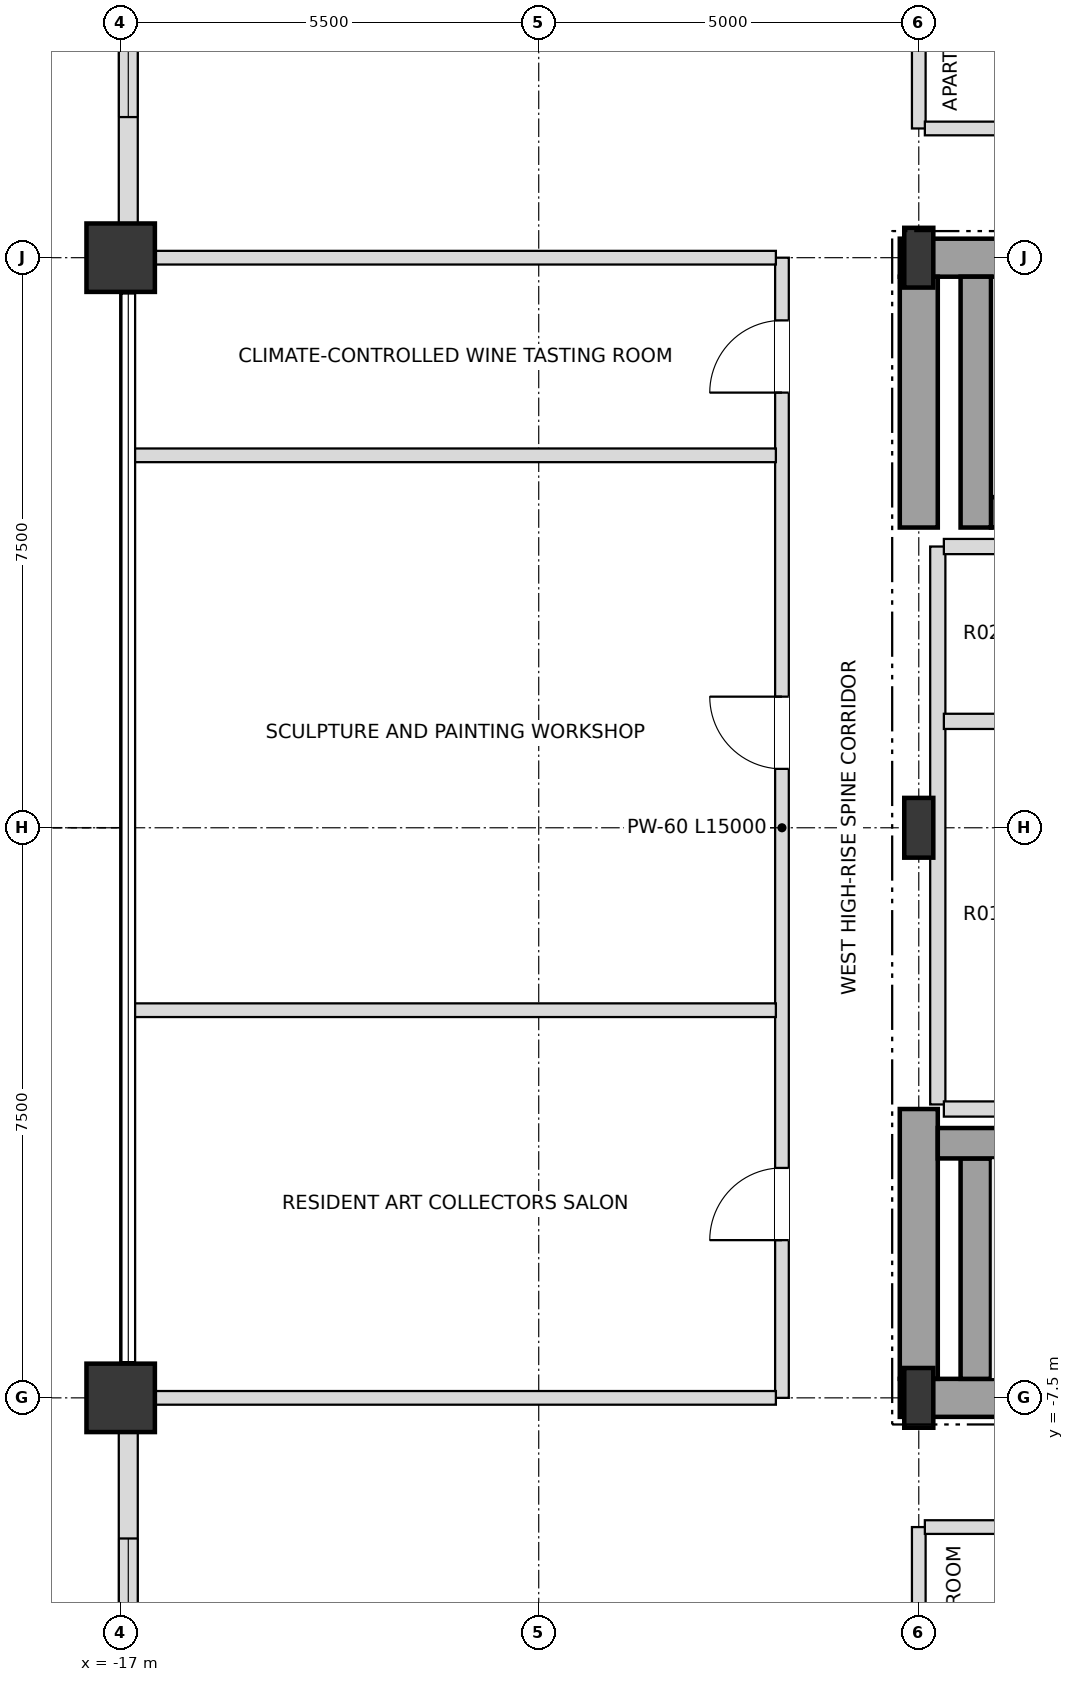
"""IFC4 building model, lengths in metres.
Left out: names, types, materials, properties, quantities, classifications, styles, units other than length and angle.
Written with IfcOpenShell. Run it as: python <this file> out.ifc"""

import sys

from ifc_helpers import new_model, si_unit, direction, frame, frame_2d, origin, origin_2d, place, context, subcontext, project, spatial, rectangle, i_section, extrude, element, fill, save


model = new_model("IFC4")
c1 = context("Model", 3, precision=1e-05, world=origin(), true_north=direction((0.0, 1.0)))
c2 = subcontext(c1, "Body", "Model", "MODEL_VIEW")
j1 = project(units=[si_unit("LENGTHUNIT", "METRE"), si_unit("PLANEANGLEUNIT", "RADIAN")], contexts=[c1])
p1 = place(None, origin())
s1 = spatial("IfcSite", under=j1, at=p1, CompositionType="ELEMENT")
p2 = place(p1, origin())
s2 = spatial("IfcBuilding", under=s1, at=p2, CompositionType="ELEMENT")
p3 = place(p2, frame((0.0, 0.0, 240.3)))
s3 = spatial("IfcBuildingStorey", under=s2, at=p3, CompositionType="ELEMENT", Elevation=240.3)
for number, where, z_axis, x_axis in (
    (1, (-6.5, -7.5, 0.0), (0.0, 0.0, 1.0), (1.0, 0.0, 0.0)),
    (2, (-6.5, 0.0, 0.0), (0.0, 0.0, 1.0), (1.0, 0.0, 0.0)),
    (3, (-6.5, 7.5, 0.0), (0.0, 0.0, 1.0), (1.0, 0.0, 0.0)),
):
    element("IfcColumn", number, at=place(p3, frame(where, z_axis=z_axis, x_axis=x_axis)), inside=s3, PredefinedType="COLUMN", context=c2, shape_type="SweptSolid", body=[
        extrude(i_section(OverallWidth=0.382, OverallDepth=0.786, WebThickness=0.02, FlangeThickness=0.033, at=origin_2d()), origin(), (0.0, 0.0, 1.0), 3.6),
    ])
for number, where, z_axis, x_axis in (
    (4, (-17.0, 7.5, 0.0), (0.0, 0.0, 1.0), (1.0, 0.0, 0.0)),
    (5, (-17.0, -7.5, 0.0), (0.0, 0.0, 1.0), (1.0, 0.0, 0.0)),
):
    element("IfcColumn", number, at=place(p3, frame(where, z_axis=z_axis, x_axis=x_axis)), inside=s3, PredefinedType="USERDEFINED", context=c2, shape_type="SweptSolid", body=[
        extrude(rectangle(XDim=0.9, YDim=0.9, at=origin_2d()), origin(), (0.0, 0.0, 1.0), 3.6),
    ])
p4 = place(p3, frame((-16.9, 12.555, 0.0), z_axis=(0.0, 0.0, 1.0), x_axis=(0.0, -1.0, 0.0)))
e6 = element("IfcWall", 6, at=p4, inside=s3, PredefinedType="SOLIDWALL", context=c2, shape_type="SweptSolid", body=[
    extrude(rectangle(XDim=4.61, YDim=0.25, at=frame_2d((2.305, 0.0))), origin(), (0.0, 0.0, 1.0), 2.748),
])
p5 = place(p4, frame((1.405, 0.0, 0.72)))
e7 = element("IfcOpeningElement", 7, at=p5, cuts=e6, PredefinedType="OPENING", context=c2, shape_type="SweptSolid", body=[
    extrude(rectangle(XDim=1.8, YDim=1.68, at=frame_2d((0.9, 0.84))), frame((0.0, 0.135, 0.0), z_axis=(0.0, -1.0, 0.0), x_axis=(1.0, 0.0, 0.0)), (0.0, 0.0, 1.0), 0.27),
])
p6 = place(p3, frame((-16.9, -7.945, 0.0), z_axis=(0.0, 0.0, 1.0), x_axis=(0.0, -1.0, 0.0)))
e8 = element("IfcWall", 8, at=p6, inside=s3, PredefinedType="SOLIDWALL", context=c2, shape_type="SweptSolid", body=[
    extrude(rectangle(XDim=4.61, YDim=0.25, at=frame_2d((2.305, 0.0))), origin(), (0.0, 0.0, 1.0), 2.748),
])
p7 = place(p6, frame((1.405, 0.0, 0.72)))
e9 = element("IfcOpeningElement", 9, at=p7, cuts=e8, PredefinedType="OPENING", context=c2, shape_type="SweptSolid", body=[
    extrude(rectangle(XDim=1.8, YDim=1.68, at=frame_2d((0.9, 0.84))), frame((0.0, 0.135, 0.0), z_axis=(0.0, -1.0, 0.0), x_axis=(1.0, 0.0, 0.0)), (0.0, 0.0, 1.0), 0.27),
])
p8 = place(p3, frame((-6.75, -7.5, 0.0), z_axis=(0.0, 0.0, 1.0), x_axis=(1.0, 0.0, 0.0)))
e10 = element("IfcWall", 10, at=p8, inside=s3, PredefinedType="SHEAR", context=c2, shape_type="SweptSolid", body=[
    extrude(rectangle(XDim=6.75, YDim=0.5, at=frame_2d((3.375, 0.0))), origin(), (0.0, 0.0, 1.0), 3.38),
])
p9 = place(p3, frame((-6.75, 7.5, 0.0), z_axis=(0.0, 0.0, 1.0), x_axis=(1.0, 0.0, 0.0)))
e11 = element("IfcWall", 11, at=p9, inside=s3, PredefinedType="SHEAR", context=c2, shape_type="SweptSolid", body=[
    extrude(rectangle(XDim=6.75, YDim=0.5, at=frame_2d((3.375, 0.0))), origin(), (0.0, 0.0, 1.0), 3.38),
])
p10 = place(p9, frame((1.65, 0.0, 0.0)))
e12 = element("IfcOpeningElement", 12, at=p10, cuts=e11, PredefinedType="OPENING", context=c2, shape_type="SweptSolid", body=[
    extrude(rectangle(XDim=1.05, YDim=2.15, at=frame_2d((0.525, 1.075))), frame((0.0, 0.26, 0.0), z_axis=(0.0, -1.0, 0.0), x_axis=(1.0, 0.0, 0.0)), (0.0, 0.0, 1.0), 0.52),
])
p11 = place(p3, frame((-6.5, -7.25, 0.0), z_axis=(0.0, 0.0, 1.0), x_axis=(0.0, 1.0, 0.0)))
e13 = element("IfcWall", 13, at=p11, inside=s3, PredefinedType="SHEAR", context=c2, shape_type="SweptSolid", body=[
    extrude(rectangle(XDim=3.55, YDim=0.5, at=frame_2d((1.775, 0.0))), origin(), (0.0, 0.0, 1.0), 3.38),
])
p12 = place(p3, frame((-6.5, 3.95, 0.0), z_axis=(0.0, 0.0, 1.0), x_axis=(0.0, 1.0, 0.0)))
e14 = element("IfcWall", 14, at=p12, inside=s3, PredefinedType="SHEAR", context=c2, shape_type="SweptSolid", body=[
    extrude(rectangle(XDim=3.3, YDim=0.5, at=frame_2d((1.65, 0.0))), origin(), (0.0, 0.0, 1.0), 3.38),
])
p13 = place(p3, frame((-5.75, -7.25, 0.0), z_axis=(0.0, 0.0, 1.0), x_axis=(0.0, 1.0, 0.0)))
e15 = element("IfcWall", 15, at=p13, inside=s3, PredefinedType="SHEAR", context=c2, shape_type="SweptSolid", body=[
    extrude(rectangle(XDim=2.9, YDim=0.4, at=frame_2d((1.45, 0.0))), origin(), (0.0, 0.0, 1.0), 3.38),
])
p14 = place(p3, frame((-6.25, -4.15, 0.0), z_axis=(0.0, 0.0, 1.0), x_axis=(1.0, 0.0, 0.0)))
e16 = element("IfcWall", 16, at=p14, inside=s3, PredefinedType="SHEAR", context=c2, shape_type="SweptSolid", body=[
    extrude(rectangle(XDim=7.78, YDim=0.4, at=frame_2d((3.89, 0.0))), origin(), (0.0, 0.0, 1.0), 3.38),
])
p15 = place(p3, frame((-5.55, 4.15, 0.0), z_axis=(0.0, 0.0, 1.0), x_axis=(1.0, 0.0, 0.0)))
e17 = element("IfcWall", 17, at=p15, inside=s3, PredefinedType="SHEAR", context=c2, shape_type="SweptSolid", body=[
    extrude(rectangle(XDim=7.08, YDim=0.4, at=frame_2d((3.54, 0.0))), origin(), (0.0, 0.0, 1.0), 3.38),
])
p16 = place(p3, frame((-5.75, 3.95, 0.0), z_axis=(0.0, 0.0, 1.0), x_axis=(0.0, 1.0, 0.0)))
e18 = element("IfcWall", 18, at=p16, inside=s3, PredefinedType="SHEAR", context=c2, shape_type="SweptSolid", body=[
    extrude(rectangle(XDim=3.3, YDim=0.4, at=frame_2d((1.65, 0.0))), origin(), (0.0, 0.0, 1.0), 3.38),
])
p17 = place(p3, frame((-8.3, -7.5, 0.0), z_axis=(0.0, 0.0, 1.0), x_axis=(0.0, 1.0, 0.0)))
e19 = element("IfcWall", 19, at=p17, inside=s3, PredefinedType="PARTITIONING", context=c2, shape_type="SweptSolid", body=[
    extrude(rectangle(XDim=15.0, YDim=0.18, at=frame_2d((7.5, 0.0))), origin(), (0.0, 0.0, 1.0), 3.38),
])
p18 = place(p17, frame((2.075, 0.0, 0.0)))
e20 = element("IfcOpeningElement", 20, at=p18, cuts=e19, PredefinedType="OPENING", context=c2, shape_type="SweptSolid", body=[
    extrude(rectangle(XDim=0.95, YDim=2.15, at=frame_2d((0.475, 1.075))), frame((0.0, 0.1, 0.0), z_axis=(0.0, -1.0, 0.0), x_axis=(1.0, 0.0, 0.0)), (0.0, 0.0, 1.0), 0.2),
])
p19 = place(p17, frame((8.275, 0.0, 0.0)))
e21 = element("IfcOpeningElement", 21, at=p19, cuts=e19, PredefinedType="OPENING", context=c2, shape_type="SweptSolid", body=[
    extrude(rectangle(XDim=0.95, YDim=2.15, at=frame_2d((0.475, 1.075))), frame((0.0, 0.1, 0.0), z_axis=(0.0, -1.0, 0.0), x_axis=(1.0, 0.0, 0.0)), (0.0, 0.0, 1.0), 0.2),
])
p20 = place(p17, frame((13.225, 0.0, 0.0)))
e22 = element("IfcOpeningElement", 22, at=p20, cuts=e19, PredefinedType="OPENING", context=c2, shape_type="SweptSolid", body=[
    extrude(rectangle(XDim=0.95, YDim=2.15, at=frame_2d((0.475, 1.075))), frame((0.0, 0.1, 0.0), z_axis=(0.0, -1.0, 0.0), x_axis=(1.0, 0.0, 0.0)), (0.0, 0.0, 1.0), 0.2),
])
for number, where, z_axis, x_axis in (
    (23, (-6.5, -19.9, 0.0), (0.0, 0.0, 1.0), (0.0, 1.0, 0.0)),
    (24, (-6.5, 9.2, 0.0), (0.0, 0.0, 1.0), (0.0, 1.0, 0.0)),
):
    element("IfcWall", number, at=place(p3, frame(where, z_axis=z_axis, x_axis=x_axis)), inside=s3, PredefinedType="PARTITIONING", context=c2, shape_type="SweptSolid", body=[
        extrude(rectangle(XDim=10.7, YDim=0.18, at=frame_2d((5.35, 0.0))), origin(), (0.0, 0.0, 1.0), 2.826),
    ])
p21 = place(p3, frame((-6.25, -3.64, 0.0), z_axis=(0.0, 0.0, 1.0), x_axis=(0.0, 1.0, 0.0)))
e25 = element("IfcWall", 25, at=p21, inside=s3, PredefinedType="SOLIDWALL", context=c2, shape_type="SweptSolid", body=[
    extrude(rectangle(XDim=7.34, YDim=0.2, at=frame_2d((3.67, 0.0))), origin(), (0.0, 0.0, 1.0), 3.38),
])
p22 = place(p3, frame((-6.42, -9.2, 0.0), z_axis=(0.0, 0.0, 1.0), x_axis=(1.0, 0.0, 0.0)))
e26 = element("IfcWall", 26, at=p22, inside=s3, PredefinedType="PARTITIONING", context=c2, shape_type="SweptSolid", body=[
    extrude(rectangle(XDim=1.69, YDim=0.18, at=frame_2d((0.845, 0.0))), origin(), (0.0, 0.0, 1.0), 3.38),
])
p23 = place(p3, frame((-16.9, -7.5, 0.0), z_axis=(0.0, 0.0, 1.0), x_axis=(1.0, 0.0, 0.0)))
e27 = element("IfcWall", 27, at=p23, inside=s3, PredefinedType="PARTITIONING", context=c2, shape_type="SweptSolid", body=[
    extrude(rectangle(XDim=8.52, YDim=0.18, at=frame_2d((4.26, 0.0))), origin(), (0.0, 0.0, 1.0), 2.826),
])
p24 = place(p3, frame((-6.17, -3.7, 0.0), z_axis=(0.0, 0.0, 1.0), x_axis=(1.0, 0.0, 0.0)))
e28 = element("IfcWall", 28, at=p24, inside=s3, PredefinedType="SOLIDWALL", context=c2, shape_type="SweptSolid", body=[
    extrude(rectangle(XDim=1.94, YDim=0.2, at=frame_2d((0.97, 0.0))), origin(), (0.0, 0.0, 1.0), 3.38),
])
p25 = place(p3, frame((-16.82, -2.4, 0.0), z_axis=(0.0, 0.0, 1.0), x_axis=(1.0, 0.0, 0.0)))
e29 = element("IfcWall", 29, at=p25, inside=s3, PredefinedType="PARTITIONING", context=c2, shape_type="SweptSolid", body=[
    extrude(rectangle(XDim=8.44, YDim=0.18, at=frame_2d((4.22, 0.0))), origin(), (0.0, 0.0, 1.0), 3.018),
])
for number, where, z_axis, x_axis in (
    (30, (-6.17, 1.4, 0.0), (0.0, 0.0, 1.0), (1.0, 0.0, 0.0)),
    (31, (-6.17, 3.7, 0.0), (0.0, 0.0, 1.0), (1.0, 0.0, 0.0)),
):
    element("IfcWall", number, at=place(p3, frame(where, z_axis=z_axis, x_axis=x_axis)), inside=s3, PredefinedType="SOLIDWALL", context=c2, shape_type="SweptSolid", body=[
        extrude(rectangle(XDim=1.94, YDim=0.2, at=frame_2d((0.97, 0.0))), origin(), (0.0, 0.0, 1.0), 3.38),
    ])
p26 = place(p3, frame((-16.82, 4.9, 0.0), z_axis=(0.0, 0.0, 1.0), x_axis=(1.0, 0.0, 0.0)))
e32 = element("IfcWall", 32, at=p26, inside=s3, PredefinedType="PARTITIONING", context=c2, shape_type="SweptSolid", body=[
    extrude(rectangle(XDim=8.44, YDim=0.18, at=frame_2d((4.22, 0.0))), origin(), (0.0, 0.0, 1.0), 3.018),
])
p27 = place(p3, frame((-16.9, 7.5, 0.0), z_axis=(0.0, 0.0, 1.0), x_axis=(1.0, 0.0, 0.0)))
e33 = element("IfcWall", 33, at=p27, inside=s3, PredefinedType="PARTITIONING", context=c2, shape_type="SweptSolid", body=[
    extrude(rectangle(XDim=8.52, YDim=0.18, at=frame_2d((4.26, 0.0))), origin(), (0.0, 0.0, 1.0), 2.826),
])
p28 = place(p3, frame((-6.42, 9.2, 0.0), z_axis=(0.0, 0.0, 1.0), x_axis=(1.0, 0.0, 0.0)))
e34 = element("IfcWall", 34, at=p28, inside=s3, PredefinedType="PARTITIONING", context=c2, shape_type="SweptSolid", body=[
    extrude(rectangle(XDim=1.64, YDim=0.18, at=frame_2d((0.82, 0.0))), origin(), (0.0, 0.0, 1.0), 3.38),
])
p29 = place(p5, origin())
e35 = element("IfcWindow", 35, at=p29, inside=s3, PartitioningType="SINGLE_PANEL", PredefinedType="WINDOW", context=c2, shape_type="SweptSolid", body=[
    extrude(rectangle(XDim=1.8, YDim=1.68, at=frame_2d((0.9, 0.84))), frame((0.0, 0.03, 0.0), z_axis=(0.0, -1.0, 0.0), x_axis=(1.0, 0.0, 0.0)), (0.0, 0.0, 1.0), 0.06),
])
fill(e7, e35)
p30 = place(p7, origin())
e36 = element("IfcWindow", 36, at=p30, inside=s3, PartitioningType="SINGLE_PANEL", PredefinedType="WINDOW", context=c2, shape_type="SweptSolid", body=[
    extrude(rectangle(XDim=1.8, YDim=1.68, at=frame_2d((0.9, 0.84))), frame((0.0, 0.03, 0.0), z_axis=(0.0, -1.0, 0.0), x_axis=(1.0, 0.0, 0.0)), (0.0, 0.0, 1.0), 0.06),
])
fill(e9, e36)
p31 = place(p18, origin())
e37 = element("IfcDoor", 37, at=p31, inside=s3, OperationType="SINGLE_SWING_LEFT", PredefinedType="DOOR", context=c2, shape_type="SweptSolid", body=[
    extrude(rectangle(XDim=0.95, YDim=2.15, at=frame_2d((0.475, 1.075))), frame((0.0, 0.025, 0.0), z_axis=(0.0, -1.0, 0.0), x_axis=(1.0, 0.0, 0.0)), (0.0, 0.0, 1.0), 0.05),
])
fill(e20, e37)
p32 = place(p19, origin())
e38 = element("IfcDoor", 38, at=p32, inside=s3, OperationType="SINGLE_SWING_RIGHT", PredefinedType="DOOR", context=c2, shape_type="SweptSolid", body=[
    extrude(rectangle(XDim=0.95, YDim=2.15, at=frame_2d((0.475, 1.075))), frame((0.0, 0.025, 0.0), z_axis=(0.0, -1.0, 0.0), x_axis=(1.0, 0.0, 0.0)), (0.0, 0.0, 1.0), 0.05),
])
fill(e21, e38)
p33 = place(p20, origin())
e39 = element("IfcDoor", 39, at=p33, inside=s3, OperationType="SINGLE_SWING_LEFT", PredefinedType="DOOR", context=c2, shape_type="SweptSolid", body=[
    extrude(rectangle(XDim=0.95, YDim=2.15, at=frame_2d((0.475, 1.075))), frame((0.0, 0.025, 0.0), z_axis=(0.0, -1.0, 0.0), x_axis=(1.0, 0.0, 0.0)), (0.0, 0.0, 1.0), 0.05),
])
fill(e22, e39)
save(model, sys.argv[1])
